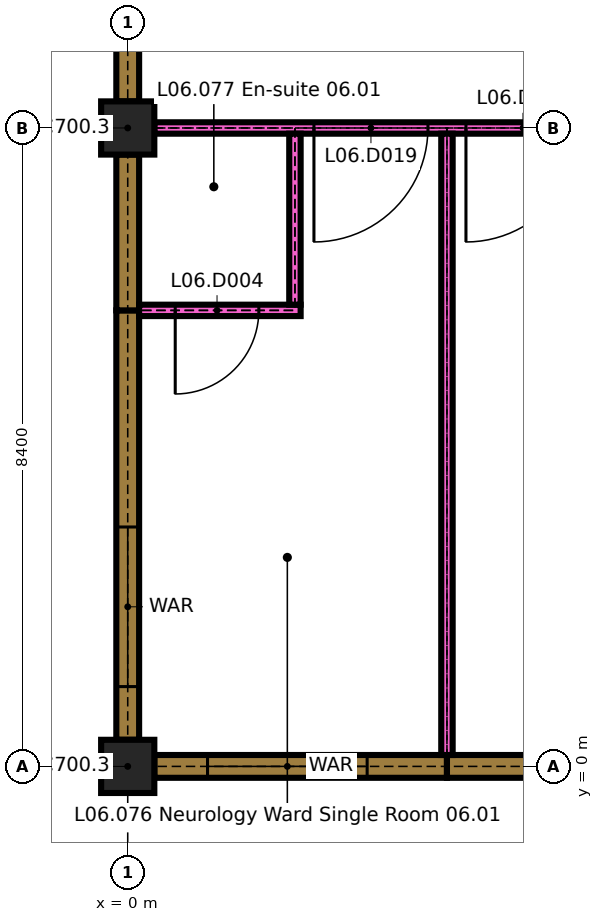
"""IFC4 building model, lengths in metres.
Left out: names, types, materials, properties, quantities, classifications, styles, units other than length and angle.
Written with IfcOpenShell. Run it as: python <this file> out.ifc"""

import sys

from ifc_helpers import new_model, si_unit, direction, frame, frame_2d, origin, origin_2d, place, context, subcontext, project, spatial, rectangle, extrude, element, fill, save


model = new_model("IFC4")
c1 = context("Model", 3, precision=1e-05, world=origin(), true_north=direction((0.0, 1.0)))
c2 = subcontext(c1, "Body", "Model", "MODEL_VIEW")
j1 = project(units=[si_unit("LENGTHUNIT", "METRE"), si_unit("PLANEANGLEUNIT", "RADIAN")], contexts=[c1])
p1 = place(None, origin())
s1 = spatial("IfcSite", under=j1, at=p1, CompositionType="ELEMENT")
p2 = place(p1, origin())
s2 = spatial("IfcBuilding", under=s1, at=p2, CompositionType="ELEMENT")
p3 = place(p2, frame((0.0, 0.0, 26.1)))
s3 = spatial("IfcBuildingStorey", under=s2, at=p3, CompositionType="ELEMENT", Elevation=26.1)
for number, where, z_axis, x_axis in (
    (1, (0.0, 0.0, 0.0), (0.0, 0.0, 1.0), (1.0, 0.0, 0.0)),
    (2, (0.0, 8.4, 0.0), (0.0, 0.0, 1.0), (1.0, 0.0, 0.0)),
):
    element("IfcColumn", number, at=place(p3, frame(where, z_axis=z_axis, x_axis=x_axis)), inside=s3, PredefinedType="COLUMN", context=c2, shape_type="SweptSolid", body=[
        extrude(rectangle(XDim=0.7, YDim=0.7, at=origin_2d()), origin(), (0.0, 0.0, 1.0), 3.2),
    ])
p4 = place(p3, frame((0.35, 0.0, 0.0), z_axis=(0.0, 0.0, 1.0), x_axis=(1.0, 0.0, 0.0)))
e3 = element("IfcWall", 3, at=p4, inside=s3, PredefinedType="SOLIDWALL", context=c2, shape_type="SweptSolid", body=[
    extrude(rectangle(XDim=3.85, YDim=0.3, at=frame_2d((1.925, 0.0))), origin(), (0.0, 0.0, 1.0), 2.9),
])
p5 = place(p4, frame((0.7, 0.0, 0.9)))
e4 = element("IfcOpeningElement", 4, at=p5, cuts=e3, PredefinedType="OPENING", context=c2, shape_type="SweptSolid", body=[
    extrude(rectangle(XDim=2.1, YDim=1.5, at=frame_2d((1.05, 0.75))), frame((0.0, 0.16, 0.0), z_axis=(0.0, -1.0, 0.0), x_axis=(1.0, 0.0, 0.0)), (0.0, 0.0, 1.0), 0.32),
])
p6 = place(p3, frame((4.2, 0.0, 0.0), z_axis=(0.0, 0.0, 1.0), x_axis=(1.0, 0.0, 0.0)))
e5 = element("IfcWall", 5, at=p6, inside=s3, PredefinedType="SOLIDWALL", context=c2, shape_type="SweptSolid", body=[
    extrude(rectangle(XDim=3.85, YDim=0.3, at=frame_2d((1.925, 0.0))), origin(), (0.0, 0.0, 1.0), 2.9),
])
p7 = place(p6, frame((1.05, 0.0, 0.9)))
e6 = element("IfcOpeningElement", 6, at=p7, cuts=e5, PredefinedType="OPENING", context=c2, shape_type="SweptSolid", body=[
    extrude(rectangle(XDim=2.1, YDim=1.5, at=frame_2d((1.05, 0.75))), frame((0.0, 0.16, 0.0), z_axis=(0.0, -1.0, 0.0), x_axis=(1.0, 0.0, 0.0)), (0.0, 0.0, 1.0), 0.32),
])
p8 = place(p3, frame((0.0, 0.35, 0.0), z_axis=(0.0, 0.0, 1.0), x_axis=(0.0, 1.0, 0.0)))
e7 = element("IfcWall", 7, at=p8, inside=s3, PredefinedType="SOLIDWALL", context=c2, shape_type="SweptSolid", body=[
    extrude(rectangle(XDim=5.65, YDim=0.3, at=frame_2d((2.825, 0.0))), origin(), (0.0, 0.0, 1.0), 2.9),
])
p9 = place(p8, frame((0.7, 0.0, 0.9)))
e8 = element("IfcOpeningElement", 8, at=p9, cuts=e7, PredefinedType="OPENING", context=c2, shape_type="SweptSolid", body=[
    extrude(rectangle(XDim=2.1, YDim=1.5, at=frame_2d((1.05, 0.75))), frame((0.0, 0.16, 0.0), z_axis=(0.0, -1.0, 0.0), x_axis=(1.0, 0.0, 0.0)), (0.0, 0.0, 1.0), 0.32),
])
p10 = place(p3, frame((0.0, 6.0, 0.0), z_axis=(0.0, 0.0, 1.0), x_axis=(0.0, 1.0, 0.0)))
e9 = element("IfcWall", 9, at=p10, inside=s3, PredefinedType="SOLIDWALL", context=c2, shape_type="SweptSolid", body=[
    extrude(rectangle(XDim=2.05, YDim=0.3, at=frame_2d((1.025, 0.0))), origin(), (0.0, 0.0, 1.0), 2.9),
])
p11 = place(p3, frame((0.0, 8.75, 0.0), z_axis=(0.0, 0.0, 1.0), x_axis=(0.0, 1.0, 0.0)))
e10 = element("IfcWall", 10, at=p11, inside=s3, PredefinedType="SOLIDWALL", context=c2, shape_type="SweptSolid", body=[
    extrude(rectangle(XDim=2.65, YDim=0.3, at=frame_2d((1.325, 0.0))), origin(), (0.0, 0.0, 1.0), 2.9),
])
p12 = place(p11, frame((1.3, 0.0, 0.9)))
e11 = element("IfcOpeningElement", 11, at=p12, cuts=e10, PredefinedType="OPENING", context=c2, shape_type="SweptSolid", body=[
    extrude(rectangle(XDim=0.9, YDim=1.5, at=frame_2d((0.45, 0.75))), frame((0.0, 0.16, 0.0), z_axis=(0.0, -1.0, 0.0), x_axis=(1.0, 0.0, 0.0)), (0.0, 0.0, 1.0), 0.32),
])
p13 = place(p3, frame((0.15, 6.0, 0.0), z_axis=(0.0, 0.0, 1.0), x_axis=(1.0, 0.0, 0.0)))
e12 = element("IfcWall", 12, at=p13, inside=s3, PredefinedType="PARTITIONING", context=c2, shape_type="SweptSolid", body=[
    extrude(rectangle(XDim=2.125, YDim=0.15, at=frame_2d((1.062, 0.0))), origin(), (0.0, 0.0, 1.0), 3.3),
])
p14 = place(p13, frame((0.475, 0.0, 0.0)))
e13 = element("IfcOpeningElement", 13, at=p14, cuts=e12, PredefinedType="OPENING", context=c2, shape_type="SweptSolid", body=[
    extrude(rectangle(XDim=1.1, YDim=2.1, at=frame_2d((0.55, 1.05))), frame((0.0, 0.085, 0.0), z_axis=(0.0, -1.0, 0.0), x_axis=(1.0, 0.0, 0.0)), (0.0, 0.0, 1.0), 0.17),
])
p15 = place(p3, frame((0.35, 8.4, 0.0), z_axis=(0.0, 0.0, 1.0), x_axis=(1.0, 0.0, 0.0)))
e14 = element("IfcWall", 14, at=p15, inside=s3, PredefinedType="PARTITIONING", context=c2, shape_type="SweptSolid", body=[
    extrude(rectangle(XDim=7.7, YDim=0.15, at=frame_2d((3.85, 0.0))), origin(), (0.0, 0.0, 1.0), 3.3),
])
p16 = place(p15, frame((2.1, 0.0, 0.0)))
e15 = element("IfcOpeningElement", 15, at=p16, cuts=e14, PredefinedType="OPENING", context=c2, shape_type="SweptSolid", body=[
    extrude(rectangle(XDim=1.5, YDim=2.4, at=frame_2d((0.75, 1.2))), frame((0.0, 0.085, 0.0), z_axis=(0.0, -1.0, 0.0), x_axis=(1.0, 0.0, 0.0)), (0.0, 0.0, 1.0), 0.17),
])
p17 = place(p15, frame((4.1, 0.0, 0.0)))
e16 = element("IfcOpeningElement", 16, at=p17, cuts=e14, PredefinedType="OPENING", context=c2, shape_type="SweptSolid", body=[
    extrude(rectangle(XDim=1.5, YDim=2.4, at=frame_2d((0.75, 1.2))), frame((0.0, 0.085, 0.0), z_axis=(0.0, -1.0, 0.0), x_axis=(1.0, 0.0, 0.0)), (0.0, 0.0, 1.0), 0.17),
])
p18 = place(p3, frame((2.2, 6.075, 0.0), z_axis=(0.0, 0.0, 1.0), x_axis=(0.0, 1.0, 0.0)))
e17 = element("IfcWall", 17, at=p18, inside=s3, PredefinedType="PARTITIONING", context=c2, shape_type="SweptSolid", body=[
    extrude(rectangle(XDim=2.25, YDim=0.15, at=frame_2d((1.125, 0.0))), origin(), (0.0, 0.0, 1.0), 3.3),
])
p19 = place(p3, frame((4.2, 0.15, 0.0), z_axis=(0.0, 0.0, 1.0), x_axis=(0.0, 1.0, 0.0)))
e18 = element("IfcWall", 18, at=p19, inside=s3, PredefinedType="PARTITIONING", context=c2, shape_type="SweptSolid", body=[
    extrude(rectangle(XDim=8.175, YDim=0.15, at=frame_2d((4.087, 0.0))), origin(), (0.0, 0.0, 1.0), 3.3),
])
p20 = place(p5, origin())
e19 = element("IfcWindow", 19, at=p20, inside=s3, PartitioningType="DOUBLE_PANEL_VERTICAL", PredefinedType="WINDOW", context=c2, shape_type="SweptSolid", body=[
    extrude(rectangle(XDim=2.1, YDim=1.5, at=frame_2d((1.05, 0.75))), frame((0.0, 0.05, 0.0), z_axis=(0.0, -1.0, 0.0), x_axis=(1.0, 0.0, 0.0)), (0.0, 0.0, 1.0), 0.1),
])
fill(e4, e19)
p21 = place(p9, origin())
e20 = element("IfcWindow", 20, at=p21, inside=s3, PartitioningType="DOUBLE_PANEL_VERTICAL", PredefinedType="WINDOW", context=c2, shape_type="SweptSolid", body=[
    extrude(rectangle(XDim=2.1, YDim=1.5, at=frame_2d((1.05, 0.75))), frame((0.0, 0.05, 0.0), z_axis=(0.0, -1.0, 0.0), x_axis=(1.0, 0.0, 0.0)), (0.0, 0.0, 1.0), 0.1),
])
fill(e8, e20)
p22 = place(p14, origin())
e21 = element("IfcDoor", 21, at=p22, inside=s3, OperationType="SINGLE_SWING_LEFT", PredefinedType="DOOR", context=c2, shape_type="SweptSolid", body=[
    extrude(rectangle(XDim=1.1, YDim=2.1, at=frame_2d((0.55, 1.05))), frame((0.0, 0.025, 0.0), z_axis=(0.0, -1.0, 0.0), x_axis=(1.0, 0.0, 0.0)), (0.0, 0.0, 1.0), 0.05),
])
fill(e13, e21)
p23 = place(p16, origin())
e22 = element("IfcDoor", 22, at=p23, inside=s3, OperationType="SINGLE_SWING_LEFT", PredefinedType="DOOR", context=c2, shape_type="SweptSolid", body=[
    extrude(rectangle(XDim=1.5, YDim=2.4, at=frame_2d((0.75, 1.2))), frame((0.0, 0.03, 0.0), z_axis=(0.0, -1.0, 0.0), x_axis=(1.0, 0.0, 0.0)), (0.0, 0.0, 1.0), 0.06),
])
fill(e15, e22)
p24 = place(p17, origin())
e23 = element("IfcDoor", 23, at=p24, inside=s3, OperationType="SINGLE_SWING_LEFT", PredefinedType="DOOR", context=c2, shape_type="SweptSolid", body=[
    extrude(rectangle(XDim=1.5, YDim=2.4, at=frame_2d((0.75, 1.2))), frame((0.0, 0.03, 0.0), z_axis=(0.0, -1.0, 0.0), x_axis=(1.0, 0.0, 0.0)), (0.0, 0.0, 1.0), 0.06),
])
fill(e16, e23)
save(model, sys.argv[1])
